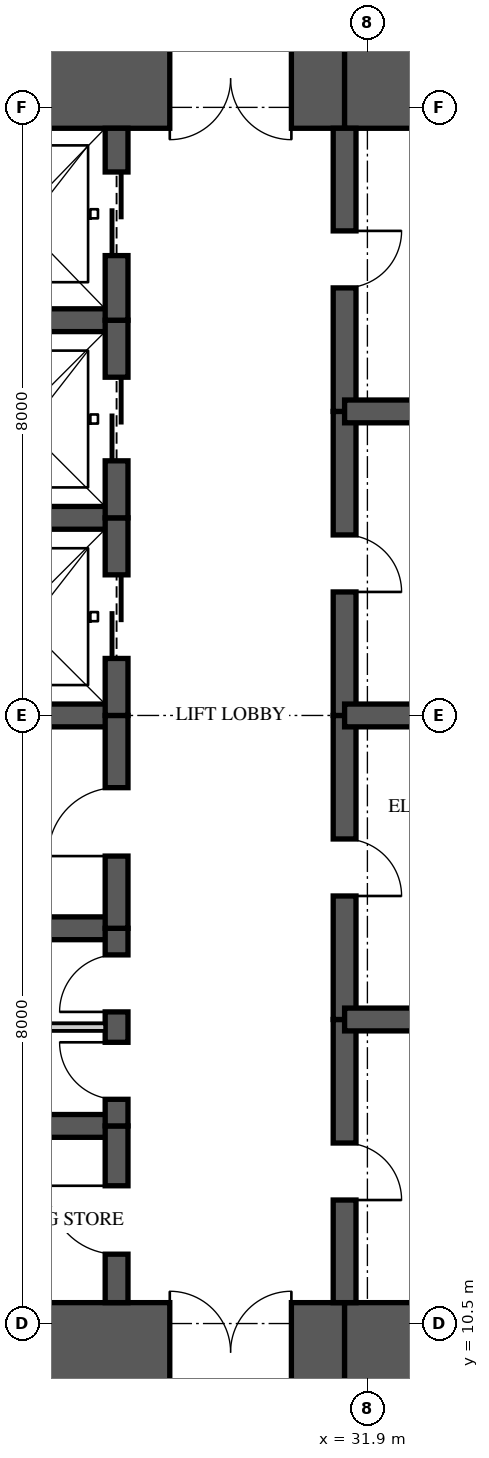
"""IFC4 building model, lengths in metres.
Left out: names, types, materials, properties, quantities, classifications, styles, units other than length and angle.
Written with IfcOpenShell. Run it as: python <this file> out.ifc"""

import sys

from ifc_helpers import new_model, si_unit, direction, frame, frame_2d, origin, place, context, subcontext, project, spatial, rectangle, extrude, element, fill, save


model = new_model("IFC4")
c1 = context("Model", 3, precision=1e-05, world=origin(), true_north=direction((0.0, 1.0)))
c2 = subcontext(c1, "Body", "Model", "MODEL_VIEW")
j1 = project(units=[si_unit("LENGTHUNIT", "METRE"), si_unit("PLANEANGLEUNIT", "RADIAN")], contexts=[c1])
p1 = place(None, origin())
s1 = spatial("IfcSite", under=j1, at=p1, CompositionType="ELEMENT")
p2 = place(p1, origin())
s2 = spatial("IfcBuilding", under=s1, at=p2, CompositionType="ELEMENT")
p3 = place(p2, frame((0.0, 0.0, 181.15)))
s3 = spatial("IfcBuildingStorey", under=s2, at=p3, CompositionType="ELEMENT", Elevation=181.15)
p4 = place(p3, frame((26.0, 10.125, 0.0), z_axis=(0.0, 0.0, 1.0), x_axis=(1.0, 0.0, 0.0)))
e1 = element("IfcWall", 1, at=p4, inside=s3, PredefinedType="SHEAR", context=c2, shape_type="SweptSolid", body=[
    extrude(rectangle(XDim=5.6, YDim=1.3, at=frame_2d((2.8, 0.0))), origin(), (0.0, 0.0, 1.0), 3.35),
])
p5 = place(p4, frame((3.3, 0.0, 0.0)))
e2 = element("IfcOpeningElement", 2, at=p5, cuts=e1, PredefinedType="OPENING", context=c2, shape_type="SweptSolid", body=[
    extrude(rectangle(XDim=1.6, YDim=2.1, at=frame_2d((0.8, 1.05))), frame((0.0, 0.66, 0.0), z_axis=(0.0, -1.0, 0.0), x_axis=(1.0, 0.0, 0.0)), (0.0, 0.0, 1.0), 1.32),
])
for number, where, z_axis, x_axis in (
    (3, (31.6, 10.125, 0.0), (0.0, 0.0, 1.0), (1.0, 0.0, 0.0)),
    (4, (35.9, 26.875, 0.0), (0.0, 0.0, 1.0), (-1.0, 0.0, 0.0)),
):
    element("IfcWall", number, at=place(p3, frame(where, z_axis=z_axis, x_axis=x_axis)), inside=s3, PredefinedType="SHEAR", context=c2, shape_type="SweptSolid", body=[
        extrude(rectangle(XDim=4.3, YDim=1.3, at=frame_2d((2.15, 0.0))), origin(), (0.0, 0.0, 1.0), 3.35),
    ])
p6 = place(p3, frame((31.6, 26.875, 0.0), z_axis=(0.0, 0.0, 1.0), x_axis=(-1.0, 0.0, 0.0)))
e5 = element("IfcWall", 5, at=p6, inside=s3, PredefinedType="SHEAR", context=c2, shape_type="SweptSolid", body=[
    extrude(rectangle(XDim=5.6, YDim=1.3, at=frame_2d((2.8, 0.0))), origin(), (0.0, 0.0, 1.0), 3.35),
])
p7 = place(p6, frame((0.7, 0.0, 0.0)))
e6 = element("IfcOpeningElement", 6, at=p7, cuts=e5, PredefinedType="OPENING", context=c2, shape_type="SweptSolid", body=[
    extrude(rectangle(XDim=1.6, YDim=2.1, at=frame_2d((0.8, 1.05))), frame((0.0, 0.66, 0.0), z_axis=(0.0, -1.0, 0.0), x_axis=(1.0, 0.0, 0.0)), (0.0, 0.0, 1.0), 1.32),
])
p8 = place(p3, frame((28.6, 10.775, 0.0), z_axis=(0.0, 0.0, 1.0), x_axis=(0.0, 1.0, 0.0)))
e7 = element("IfcWall", 7, at=p8, inside=s3, PredefinedType="SHEAR", context=c2, shape_type="SweptSolid", body=[
    extrude(rectangle(XDim=2.325, YDim=0.3, at=frame_2d((1.163, 0.0))), origin(), (0.0, 0.0, 1.0), 3.35),
])
p9 = place(p8, frame((0.637, 0.0, 0.0)))
e8 = element("IfcOpeningElement", 8, at=p9, cuts=e7, PredefinedType="OPENING", context=c2, shape_type="SweptSolid", body=[
    extrude(rectangle(XDim=0.9, YDim=2.1, at=frame_2d((0.45, 1.05))), frame((0.0, 0.16, 0.0), z_axis=(0.0, -1.0, 0.0), x_axis=(1.0, 0.0, 0.0)), (0.0, 0.0, 1.0), 0.32),
])
p10 = place(p3, frame((28.6, 13.1, 0.0), z_axis=(0.0, 0.0, 1.0), x_axis=(0.0, 1.0, 0.0)))
e9 = element("IfcWall", 9, at=p10, inside=s3, PredefinedType="SHEAR", context=c2, shape_type="SweptSolid", body=[
    extrude(rectangle(XDim=2.6, YDim=0.3, at=frame_2d((1.3, 0.0))), origin(), (0.0, 0.0, 1.0), 3.35),
])
p11 = place(p10, frame((0.35, 0.0, 0.0)))
e10 = element("IfcOpeningElement", 10, at=p11, cuts=e9, PredefinedType="OPENING", context=c2, shape_type="SweptSolid", body=[
    extrude(rectangle(XDim=0.75, YDim=2.1, at=frame_2d((0.375, 1.05))), frame((0.0, 0.16, 0.0), z_axis=(0.0, -1.0, 0.0), x_axis=(1.0, 0.0, 0.0)), (0.0, 0.0, 1.0), 0.32),
])
p12 = place(p10, frame((1.5, 0.0, 0.0)))
e11 = element("IfcOpeningElement", 11, at=p12, cuts=e9, PredefinedType="OPENING", context=c2, shape_type="SweptSolid", body=[
    extrude(rectangle(XDim=0.75, YDim=2.1, at=frame_2d((0.375, 1.05))), frame((0.0, 0.16, 0.0), z_axis=(0.0, -1.0, 0.0), x_axis=(1.0, 0.0, 0.0)), (0.0, 0.0, 1.0), 0.32),
])
p13 = place(p3, frame((28.6, 15.7, 0.0), z_axis=(0.0, 0.0, 1.0), x_axis=(0.0, 1.0, 0.0)))
e12 = element("IfcWall", 12, at=p13, inside=s3, PredefinedType="SHEAR", context=c2, shape_type="SweptSolid", body=[
    extrude(rectangle(XDim=2.8, YDim=0.3, at=frame_2d((1.4, 0.0))), origin(), (0.0, 0.0, 1.0), 3.35),
])
p14 = place(p13, frame((0.95, 0.0, 0.0)))
e13 = element("IfcOpeningElement", 13, at=p14, cuts=e12, PredefinedType="OPENING", context=c2, shape_type="SweptSolid", body=[
    extrude(rectangle(XDim=0.9, YDim=2.1, at=frame_2d((0.45, 1.05))), frame((0.0, 0.16, 0.0), z_axis=(0.0, -1.0, 0.0), x_axis=(1.0, 0.0, 0.0)), (0.0, 0.0, 1.0), 0.32),
])
p15 = place(p3, frame((28.6, 18.5, 0.0), z_axis=(0.0, 0.0, 1.0), x_axis=(0.0, 1.0, 0.0)))
e14 = element("IfcWall", 14, at=p15, inside=s3, PredefinedType="SHEAR", context=c2, shape_type="SweptSolid", body=[
    extrude(rectangle(XDim=2.6, YDim=0.3, at=frame_2d((1.3, 0.0))), origin(), (0.0, 0.0, 1.0), 3.35),
])
p16 = place(p15, frame((0.75, 0.0, 0.0)))
e15 = element("IfcOpeningElement", 15, at=p16, cuts=e14, PredefinedType="OPENING", context=c2, shape_type="SweptSolid", body=[
    extrude(rectangle(XDim=1.1, YDim=2.1, at=frame_2d((0.55, 1.05))), frame((0.0, 0.16, 0.0), z_axis=(0.0, -1.0, 0.0), x_axis=(1.0, 0.0, 0.0)), (0.0, 0.0, 1.0), 0.32),
])
p17 = place(p3, frame((28.6, 21.1, 0.0), z_axis=(0.0, 0.0, 1.0), x_axis=(0.0, 1.0, 0.0)))
e16 = element("IfcWall", 16, at=p17, inside=s3, PredefinedType="SHEAR", context=c2, shape_type="SweptSolid", body=[
    extrude(rectangle(XDim=2.6, YDim=0.3, at=frame_2d((1.3, 0.0))), origin(), (0.0, 0.0, 1.0), 3.35),
])
p18 = place(p17, frame((0.75, 0.0, 0.0)))
e17 = element("IfcOpeningElement", 17, at=p18, cuts=e16, PredefinedType="OPENING", context=c2, shape_type="SweptSolid", body=[
    extrude(rectangle(XDim=1.1, YDim=2.1, at=frame_2d((0.55, 1.05))), frame((0.0, 0.16, 0.0), z_axis=(0.0, -1.0, 0.0), x_axis=(1.0, 0.0, 0.0)), (0.0, 0.0, 1.0), 0.32),
])
p19 = place(p3, frame((28.6, 23.7, 0.0), z_axis=(0.0, 0.0, 1.0), x_axis=(0.0, 1.0, 0.0)))
e18 = element("IfcWall", 18, at=p19, inside=s3, PredefinedType="SHEAR", context=c2, shape_type="SweptSolid", body=[
    extrude(rectangle(XDim=2.525, YDim=0.3, at=frame_2d((1.263, 0.0))), origin(), (0.0, 0.0, 1.0), 3.35),
])
p20 = place(p19, frame((0.85, 0.0, 0.0)))
e19 = element("IfcOpeningElement", 19, at=p20, cuts=e18, PredefinedType="OPENING", context=c2, shape_type="SweptSolid", body=[
    extrude(rectangle(XDim=1.1, YDim=2.1, at=frame_2d((0.55, 1.05))), frame((0.0, 0.16, 0.0), z_axis=(0.0, -1.0, 0.0), x_axis=(1.0, 0.0, 0.0)), (0.0, 0.0, 1.0), 0.32),
])
p21 = place(p3, frame((31.6, 10.775, 0.0), z_axis=(0.0, 0.0, 1.0), x_axis=(0.0, 1.0, 0.0)))
e20 = element("IfcWall", 20, at=p21, inside=s3, PredefinedType="SHEAR", context=c2, shape_type="SweptSolid", body=[
    extrude(rectangle(XDim=3.725, YDim=0.3, at=frame_2d((1.863, 0.0))), origin(), (0.0, 0.0, 1.0), 3.35),
])
p22 = place(p21, frame((1.35, 0.0, 0.0)))
e21 = element("IfcOpeningElement", 21, at=p22, cuts=e20, PredefinedType="OPENING", context=c2, shape_type="SweptSolid", body=[
    extrude(rectangle(XDim=0.75, YDim=2.1, at=frame_2d((0.375, 1.05))), frame((0.0, 0.16, 0.0), z_axis=(0.0, -1.0, 0.0), x_axis=(1.0, 0.0, 0.0)), (0.0, 0.0, 1.0), 0.32),
])
p23 = place(p3, frame((31.6, 14.5, 0.0), z_axis=(0.0, 0.0, 1.0), x_axis=(0.0, 1.0, 0.0)))
e22 = element("IfcWall", 22, at=p23, inside=s3, PredefinedType="SHEAR", context=c2, shape_type="SweptSolid", body=[
    extrude(rectangle(XDim=4.0, YDim=0.3, at=frame_2d((2.0, 0.0))), origin(), (0.0, 0.0, 1.0), 3.35),
])
p24 = place(p23, frame((1.625, 0.0, 0.0)))
e23 = element("IfcOpeningElement", 23, at=p24, cuts=e22, PredefinedType="OPENING", context=c2, shape_type="SweptSolid", body=[
    extrude(rectangle(XDim=0.75, YDim=2.1, at=frame_2d((0.375, 1.05))), frame((0.0, 0.16, 0.0), z_axis=(0.0, -1.0, 0.0), x_axis=(1.0, 0.0, 0.0)), (0.0, 0.0, 1.0), 0.32),
])
p25 = place(p3, frame((31.6, 18.5, 0.0), z_axis=(0.0, 0.0, 1.0), x_axis=(0.0, 1.0, 0.0)))
e24 = element("IfcWall", 24, at=p25, inside=s3, PredefinedType="SHEAR", context=c2, shape_type="SweptSolid", body=[
    extrude(rectangle(XDim=4.0, YDim=0.3, at=frame_2d((2.0, 0.0))), origin(), (0.0, 0.0, 1.0), 3.35),
])
p26 = place(p25, frame((1.625, 0.0, 0.0)))
e25 = element("IfcOpeningElement", 25, at=p26, cuts=e24, PredefinedType="OPENING", context=c2, shape_type="SweptSolid", body=[
    extrude(rectangle(XDim=0.75, YDim=2.1, at=frame_2d((0.375, 1.05))), frame((0.0, 0.16, 0.0), z_axis=(0.0, -1.0, 0.0), x_axis=(1.0, 0.0, 0.0)), (0.0, 0.0, 1.0), 0.32),
])
p27 = place(p3, frame((31.6, 22.5, 0.0), z_axis=(0.0, 0.0, 1.0), x_axis=(0.0, 1.0, 0.0)))
e26 = element("IfcWall", 26, at=p27, inside=s3, PredefinedType="SHEAR", context=c2, shape_type="SweptSolid", body=[
    extrude(rectangle(XDim=3.725, YDim=0.3, at=frame_2d((1.863, 0.0))), origin(), (0.0, 0.0, 1.0), 3.35),
])
p28 = place(p27, frame((1.625, 0.0, 0.0)))
e27 = element("IfcOpeningElement", 27, at=p28, cuts=e26, PredefinedType="OPENING", context=c2, shape_type="SweptSolid", body=[
    extrude(rectangle(XDim=0.75, YDim=2.1, at=frame_2d((0.375, 1.05))), frame((0.0, 0.16, 0.0), z_axis=(0.0, -1.0, 0.0), x_axis=(1.0, 0.0, 0.0)), (0.0, 0.0, 1.0), 0.32),
])
for number, where, z_axis, x_axis in (
    (28, (26.0, 13.1, 0.0), (0.0, 0.0, 1.0), (1.0, 0.0, 0.0)),
    (29, (26.0, 15.7, 0.0), (0.0, 0.0, 1.0), (1.0, 0.0, 0.0)),
    (30, (26.0, 18.5, 0.0), (0.0, 0.0, 1.0), (1.0, 0.0, 0.0)),
    (31, (26.0, 21.1, 0.0), (0.0, 0.0, 1.0), (1.0, 0.0, 0.0)),
    (32, (26.0, 23.7, 0.0), (0.0, 0.0, 1.0), (1.0, 0.0, 0.0)),
):
    element("IfcWall", number, at=place(p3, frame(where, z_axis=z_axis, x_axis=x_axis)), inside=s3, PredefinedType="SHEAR", context=c2, shape_type="SweptSolid", body=[
        extrude(rectangle(XDim=2.6, YDim=0.3, at=frame_2d((1.3, 0.0))), origin(), (0.0, 0.0, 1.0), 3.35),
    ])
for number, where, z_axis, x_axis in (
    (33, (31.6, 14.5, 0.0), (0.0, 0.0, 1.0), (1.0, 0.0, 0.0)),
    (34, (31.6, 18.5, 0.0), (0.0, 0.0, 1.0), (1.0, 0.0, 0.0)),
    (35, (31.6, 22.5, 0.0), (0.0, 0.0, 1.0), (1.0, 0.0, 0.0)),
):
    element("IfcWall", number, at=place(p3, frame(where, z_axis=z_axis, x_axis=x_axis)), inside=s3, PredefinedType="SHEAR", context=c2, shape_type="SweptSolid", body=[
        extrude(rectangle(XDim=4.3, YDim=0.3, at=frame_2d((2.15, 0.0))), origin(), (0.0, 0.0, 1.0), 3.35),
    ])
p29 = place(p3, frame((26.15, 14.4, 0.0), z_axis=(0.0, 0.0, 1.0), x_axis=(1.0, 0.0, 0.0)))
e36 = element("IfcWall", 36, at=p29, inside=s3, PredefinedType="PARTITIONING", context=c2, shape_type="SweptSolid", body=[
    extrude(rectangle(XDim=2.3, YDim=0.1, at=frame_2d((1.15, 0.0))), origin(), (0.0, 0.0, 1.0), 3.11),
])
p30 = place(p16, origin())
e37 = element("IfcDoor", 37, at=p30, inside=s3, OperationType="SLIDING_TO_LEFT", PredefinedType="DOOR", context=c2, shape_type="SweptSolid", body=[
    extrude(rectangle(XDim=1.1, YDim=2.1, at=frame_2d((0.55, 1.05))), frame((0.0, 0.025, 0.0), z_axis=(0.0, -1.0, 0.0), x_axis=(1.0, 0.0, 0.0)), (0.0, 0.0, 1.0), 0.05),
])
fill(e15, e37)
p31 = place(p18, origin())
e38 = element("IfcDoor", 38, at=p31, inside=s3, OperationType="SLIDING_TO_LEFT", PredefinedType="DOOR", context=c2, shape_type="SweptSolid", body=[
    extrude(rectangle(XDim=1.1, YDim=2.1, at=frame_2d((0.55, 1.05))), frame((0.0, 0.025, 0.0), z_axis=(0.0, -1.0, 0.0), x_axis=(1.0, 0.0, 0.0)), (0.0, 0.0, 1.0), 0.05),
])
fill(e17, e38)
p32 = place(p20, origin())
e39 = element("IfcDoor", 39, at=p32, inside=s3, OperationType="SLIDING_TO_LEFT", PredefinedType="DOOR", context=c2, shape_type="SweptSolid", body=[
    extrude(rectangle(XDim=1.1, YDim=2.1, at=frame_2d((0.55, 1.05))), frame((0.0, 0.025, 0.0), z_axis=(0.0, -1.0, 0.0), x_axis=(1.0, 0.0, 0.0)), (0.0, 0.0, 1.0), 0.05),
])
fill(e19, e39)
p33 = place(p9, origin())
e40 = element("IfcDoor", 40, at=p33, inside=s3, OperationType="SINGLE_SWING_RIGHT", PredefinedType="DOOR", context=c2, shape_type="SweptSolid", body=[
    extrude(rectangle(XDim=0.9, YDim=2.1, at=frame_2d((0.45, 1.05))), frame((0.0, 0.025, 0.0), z_axis=(0.0, -1.0, 0.0), x_axis=(1.0, 0.0, 0.0)), (0.0, 0.0, 1.0), 0.05),
])
fill(e8, e40)
p34 = place(p11, origin())
e41 = element("IfcDoor", 41, at=p34, inside=s3, OperationType="SINGLE_SWING_RIGHT", PredefinedType="DOOR", context=c2, shape_type="SweptSolid", body=[
    extrude(rectangle(XDim=0.75, YDim=2.1, at=frame_2d((0.375, 1.05))), frame((0.0, 0.025, 0.0), z_axis=(0.0, -1.0, 0.0), x_axis=(1.0, 0.0, 0.0)), (0.0, 0.0, 1.0), 0.05),
])
fill(e10, e41)
p35 = place(p12, origin())
e42 = element("IfcDoor", 42, at=p35, inside=s3, OperationType="SINGLE_SWING_LEFT", PredefinedType="DOOR", context=c2, shape_type="SweptSolid", body=[
    extrude(rectangle(XDim=0.75, YDim=2.1, at=frame_2d((0.375, 1.05))), frame((0.0, 0.025, 0.0), z_axis=(0.0, -1.0, 0.0), x_axis=(1.0, 0.0, 0.0)), (0.0, 0.0, 1.0), 0.05),
])
fill(e11, e42)
p36 = place(p14, origin())
e43 = element("IfcDoor", 43, at=p36, inside=s3, OperationType="SINGLE_SWING_LEFT", PredefinedType="DOOR", context=c2, shape_type="SweptSolid", body=[
    extrude(rectangle(XDim=0.9, YDim=2.1, at=frame_2d((0.45, 1.05))), frame((0.0, 0.025, 0.0), z_axis=(0.0, -1.0, 0.0), x_axis=(1.0, 0.0, 0.0)), (0.0, 0.0, 1.0), 0.05),
])
fill(e13, e43)
p37 = place(p5, origin())
e44 = element("IfcDoor", 44, at=p37, inside=s3, OperationType="DOUBLE_DOOR_SINGLE_SWING", PredefinedType="DOOR", context=c2, shape_type="SweptSolid", body=[
    extrude(rectangle(XDim=1.6, YDim=2.1, at=frame_2d((0.8, 1.05))), frame((0.0, 0.025, 0.0), z_axis=(0.0, -1.0, 0.0), x_axis=(1.0, 0.0, 0.0)), (0.0, 0.0, 1.0), 0.05),
])
fill(e2, e44)
p38 = place(p7, origin())
e45 = element("IfcDoor", 45, at=p38, inside=s3, OperationType="DOUBLE_DOOR_SINGLE_SWING", PredefinedType="DOOR", context=c2, shape_type="SweptSolid", body=[
    extrude(rectangle(XDim=1.6, YDim=2.1, at=frame_2d((0.8, 1.05))), frame((0.0, 0.025, 0.0), z_axis=(0.0, -1.0, 0.0), x_axis=(1.0, 0.0, 0.0)), (0.0, 0.0, 1.0), 0.05),
])
fill(e6, e45)
p39 = place(p22, frame((0.75, 0.0, 0.0), z_axis=(0.0, 0.0, 1.0), x_axis=(-1.0, 0.0, 0.0)))
e46 = element("IfcDoor", 46, at=p39, inside=s3, OperationType="SINGLE_SWING_RIGHT", PredefinedType="DOOR", context=c2, shape_type="SweptSolid", body=[
    extrude(rectangle(XDim=0.75, YDim=2.1, at=frame_2d((0.375, 1.05))), frame((0.0, 0.025, 0.0), z_axis=(0.0, -1.0, 0.0), x_axis=(1.0, 0.0, 0.0)), (0.0, 0.0, 1.0), 0.05),
])
fill(e21, e46)
p40 = place(p24, frame((0.75, 0.0, 0.0), z_axis=(0.0, 0.0, 1.0), x_axis=(-1.0, 0.0, 0.0)))
e47 = element("IfcDoor", 47, at=p40, inside=s3, OperationType="SINGLE_SWING_RIGHT", PredefinedType="DOOR", context=c2, shape_type="SweptSolid", body=[
    extrude(rectangle(XDim=0.75, YDim=2.1, at=frame_2d((0.375, 1.05))), frame((0.0, 0.025, 0.0), z_axis=(0.0, -1.0, 0.0), x_axis=(1.0, 0.0, 0.0)), (0.0, 0.0, 1.0), 0.05),
])
fill(e23, e47)
p41 = place(p26, frame((0.75, 0.0, 0.0), z_axis=(0.0, 0.0, 1.0), x_axis=(-1.0, 0.0, 0.0)))
e48 = element("IfcDoor", 48, at=p41, inside=s3, OperationType="SINGLE_SWING_RIGHT", PredefinedType="DOOR", context=c2, shape_type="SweptSolid", body=[
    extrude(rectangle(XDim=0.75, YDim=2.1, at=frame_2d((0.375, 1.05))), frame((0.0, 0.025, 0.0), z_axis=(0.0, -1.0, 0.0), x_axis=(1.0, 0.0, 0.0)), (0.0, 0.0, 1.0), 0.05),
])
fill(e25, e48)
p42 = place(p28, frame((0.75, 0.0, 0.0), z_axis=(0.0, 0.0, 1.0), x_axis=(-1.0, 0.0, 0.0)))
e49 = element("IfcDoor", 49, at=p42, inside=s3, OperationType="SINGLE_SWING_LEFT", PredefinedType="DOOR", context=c2, shape_type="SweptSolid", body=[
    extrude(rectangle(XDim=0.75, YDim=2.1, at=frame_2d((0.375, 1.05))), frame((0.0, 0.025, 0.0), z_axis=(0.0, -1.0, 0.0), x_axis=(1.0, 0.0, 0.0)), (0.0, 0.0, 1.0), 0.05),
])
fill(e27, e49)
save(model, sys.argv[1])
